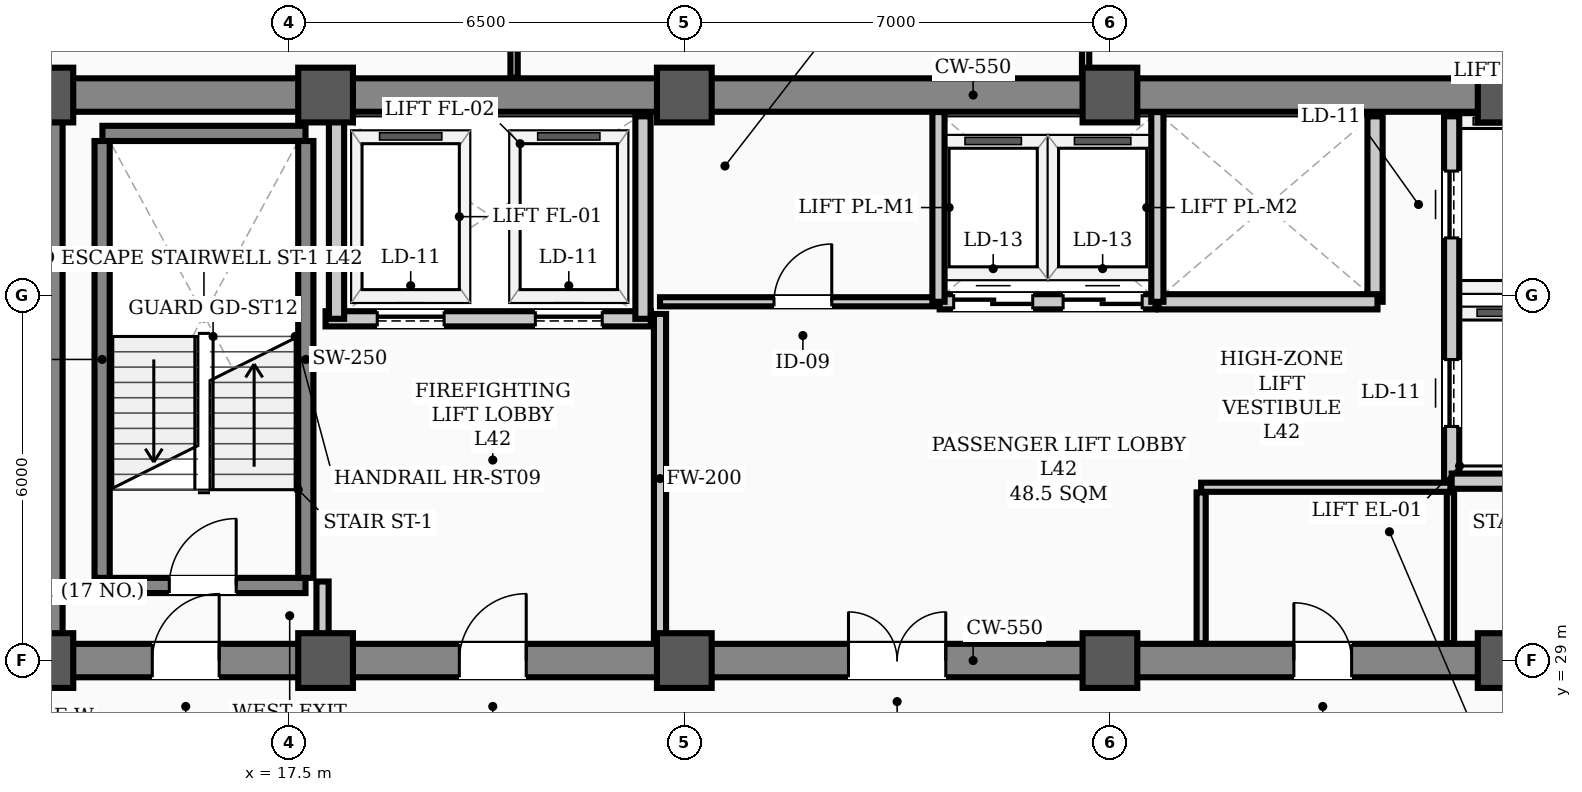
"""IFC4 building model, lengths in metres.
Left out: names, types, materials, properties, quantities, classifications, styles, units other than length and angle.
Written with IfcOpenShell. Run it as: python <this file> out.ifc"""

import sys

from ifc_helpers import new_model, si_unit, direction, frame, frame_2d, origin, origin_2d, place, context, subcontext, project, spatial, rectangle, hollow_rectangle, extrude, element, fill, save


model = new_model("IFC4")
c1 = context("Model", 3, precision=1e-05, world=origin(), true_north=direction((0.0, 1.0)))
c2 = subcontext(c1, "Body", "Model", "MODEL_VIEW")
j1 = project(units=[si_unit("LENGTHUNIT", "METRE"), si_unit("PLANEANGLEUNIT", "RADIAN")], contexts=[c1])
p1 = place(None, origin())
s1 = spatial("IfcSite", under=j1, at=p1, CompositionType="ELEMENT")
p2 = place(p1, origin())
s2 = spatial("IfcBuilding", under=s1, at=p2, CompositionType="ELEMENT")
p3 = place(p2, frame((0.0, 0.0, 169.5)))
s3 = spatial("IfcBuildingStorey", under=s2, at=p3, CompositionType="ELEMENT", Elevation=169.5)
for number, where, z_axis, x_axis in (
    (1, (13.5, 29.0, 0.0), (0.0, 0.0, 1.0), (1.0, 0.0, 0.0)),
    (2, (13.5, 38.3, 0.0), (0.0, 0.0, 1.0), (1.0, 0.0, 0.0)),
    (3, (18.1, 29.0, 0.0), (0.0, 0.0, 1.0), (1.0, 0.0, 0.0)),
    (4, (18.1, 38.3, 0.0), (0.0, 0.0, 1.0), (1.0, 0.0, 0.0)),
    (5, (24.0, 29.0, 0.0), (0.0, 0.0, 1.0), (1.0, 0.0, 0.0)),
    (6, (24.0, 38.3, 0.0), (0.0, 0.0, 1.0), (1.0, 0.0, 0.0)),
    (7, (31.0, 29.0, 0.0), (0.0, 0.0, 1.0), (1.0, 0.0, 0.0)),
    (8, (31.0, 38.3, 0.0), (0.0, 0.0, 1.0), (1.0, 0.0, 0.0)),
    (9, (37.5, 29.0, 0.0), (0.0, 0.0, 1.0), (1.0, 0.0, 0.0)),
    (10, (37.5, 38.3, 0.0), (0.0, 0.0, 1.0), (1.0, 0.0, 0.0)),
):
    element("IfcColumn", number, at=place(p3, frame(where, z_axis=z_axis, x_axis=x_axis)), inside=s3, PredefinedType="COLUMN", context=c2, shape_type="SweptSolid", body=[
        extrude(hollow_rectangle(XDim=0.9, YDim=0.9, WallThickness=0.035, InnerFilletRadius=0.017, OuterFilletRadius=0.052, at=origin_2d()), origin(), (0.0, 0.0, 1.0), 3.9),
    ])
p4 = place(p3, frame((13.5, 29.0, 0.0), z_axis=(0.0, 0.0, 1.0), x_axis=(1.0, 0.0, 0.0)))
e11 = element("IfcWall", 11, at=p4, inside=s3, PredefinedType="SHEAR", context=c2, shape_type="SweptSolid", body=[
    extrude(rectangle(XDim=30.5, YDim=0.55, at=frame_2d((15.25, 0.0))), origin(), (0.0, 0.0, 1.0), 3.72),
])
p5 = place(p4, frame((1.75, 0.0, 0.0)))
e12 = element("IfcOpeningElement", 12, at=p5, cuts=e11, PredefinedType="OPENING", context=c2, shape_type="SweptSolid", body=[
    extrude(rectangle(XDim=1.1, YDim=2.08, at=frame_2d((0.55, 1.04))), frame((0.0, 0.285, 0.0), z_axis=(0.0, -1.0, 0.0), x_axis=(1.0, 0.0, 0.0)), (0.0, 0.0, 1.0), 0.57),
])
p6 = place(p4, frame((26.7, 0.0, 0.0)))
e13 = element("IfcOpeningElement", 13, at=p6, cuts=e11, PredefinedType="OPENING", context=c2, shape_type="SweptSolid", body=[
    extrude(rectangle(XDim=1.1, YDim=2.08, at=frame_2d((0.55, 1.04))), frame((0.0, 0.285, 0.0), z_axis=(0.0, -1.0, 0.0), x_axis=(1.0, 0.0, 0.0)), (0.0, 0.0, 1.0), 0.57),
])
p7 = place(p4, frame((6.8, 0.0, 0.0)))
e14 = element("IfcOpeningElement", 14, at=p7, cuts=e11, PredefinedType="OPENING", context=c2, shape_type="SweptSolid", body=[
    extrude(rectangle(XDim=1.1, YDim=2.08, at=frame_2d((0.55, 1.04))), frame((0.0, 0.285, 0.0), z_axis=(0.0, -1.0, 0.0), x_axis=(1.0, 0.0, 0.0)), (0.0, 0.0, 1.0), 0.57),
])
p8 = place(p4, frame((13.2, 0.0, 0.0)))
e15 = element("IfcOpeningElement", 15, at=p8, cuts=e11, PredefinedType="OPENING", context=c2, shape_type="SweptSolid", body=[
    extrude(rectangle(XDim=1.6, YDim=2.08, at=frame_2d((0.8, 1.04))), frame((0.0, 0.285, 0.0), z_axis=(0.0, -1.0, 0.0), x_axis=(1.0, 0.0, 0.0)), (0.0, 0.0, 1.0), 0.57),
])
p9 = place(p4, frame((20.525, 0.0, 0.0)))
e16 = element("IfcOpeningElement", 16, at=p9, cuts=e11, PredefinedType="OPENING", context=c2, shape_type="SweptSolid", body=[
    extrude(rectangle(XDim=0.95, YDim=2.08, at=frame_2d((0.475, 1.04))), frame((0.0, 0.285, 0.0), z_axis=(0.0, -1.0, 0.0), x_axis=(1.0, 0.0, 0.0)), (0.0, 0.0, 1.0), 0.57),
])
p10 = place(p3, frame((13.5, 38.3, 0.0), z_axis=(0.0, 0.0, 1.0), x_axis=(1.0, 0.0, 0.0)))
e17 = element("IfcWall", 17, at=p10, inside=s3, PredefinedType="SHEAR", context=c2, shape_type="SweptSolid", body=[
    extrude(rectangle(XDim=30.5, YDim=0.55, at=frame_2d((15.25, 0.0))), origin(), (0.0, 0.0, 1.0), 3.72),
])
p11 = place(p3, frame((13.5, 29.35, 0.0), z_axis=(0.0, 0.0, 1.0), x_axis=(0.0, 1.0, 0.0)))
e18 = element("IfcWall", 18, at=p11, inside=s3, PredefinedType="SHEAR", context=c2, shape_type="SweptSolid", body=[
    extrude(rectangle(XDim=8.6, YDim=0.55, at=frame_2d((4.3, 0.0))), origin(), (0.0, 0.0, 1.0), 3.72),
])
p12 = place(p3, frame((14.43, 30.235, 0.0), z_axis=(0.0, 0.0, 1.0), x_axis=(1.0, 0.0, 0.0)))
e19 = element("IfcWall", 19, at=p12, inside=s3, PredefinedType="STANDARD", context=c2, shape_type="SweptSolid", body=[
    extrude(rectangle(XDim=3.34, YDim=0.25, at=frame_2d((1.67, 0.0))), origin(), (0.0, 0.0, 1.0), 3.72),
])
p13 = place(p12, frame((1.1, 0.0, 0.0)))
e20 = element("IfcOpeningElement", 20, at=p13, cuts=e19, PredefinedType="OPENING", context=c2, shape_type="SweptSolid", body=[
    extrude(rectangle(XDim=1.1, YDim=2.08, at=frame_2d((0.55, 1.04))), frame((0.0, 0.135, 0.0), z_axis=(0.0, -1.0, 0.0), x_axis=(1.0, 0.0, 0.0)), (0.0, 0.0, 1.0), 0.27),
])
p14 = place(p3, frame((14.43, 37.669, 0.0), z_axis=(0.0, 0.0, 1.0), x_axis=(1.0, 0.0, 0.0)))
e21 = element("IfcWall", 21, at=p14, inside=s3, PredefinedType="STANDARD", context=c2, shape_type="SweptSolid", body=[
    extrude(rectangle(XDim=3.34, YDim=0.25, at=frame_2d((1.67, 0.0))), origin(), (0.0, 0.0, 1.0), 3.72),
])
for number, where, z_axis, x_axis in (
    (22, (14.425, 30.36, 0.0), (0.0, 0.0, 1.0), (0.0, 1.0, 0.0)),
    (23, (17.775, 30.36, 0.0), (0.0, 0.0, 1.0), (0.0, 1.0, 0.0)),
):
    element("IfcWall", number, at=place(p3, frame(where, z_axis=z_axis, x_axis=x_axis)), inside=s3, PredefinedType="STANDARD", context=c2, shape_type="SweptSolid", body=[
        extrude(rectangle(XDim=7.184, YDim=0.25, at=frame_2d((3.592, 0.0))), origin(), (0.0, 0.0, 1.0), 3.72),
    ])
p15 = place(p3, frame((18.1, 34.62, 0.0), z_axis=(0.0, 0.0, 1.0), x_axis=(1.0, 0.0, 0.0)))
e24 = element("IfcWall", 24, at=p15, inside=s3, PredefinedType="STANDARD", context=c2, shape_type="SweptSolid", body=[
    extrude(rectangle(XDim=5.35, YDim=0.25, at=frame_2d((2.675, 0.0))), origin(), (0.0, 0.0, 1.0), 3.72),
])
p16 = place(p15, frame((0.85, 0.0, 0.0)))
e25 = element("IfcOpeningElement", 25, at=p16, cuts=e24, PredefinedType="OPENING", context=c2, shape_type="SweptSolid", body=[
    extrude(rectangle(XDim=1.1, YDim=2.08, at=frame_2d((0.55, 1.04))), frame((0.0, 0.135, 0.0), z_axis=(0.0, -1.0, 0.0), x_axis=(1.0, 0.0, 0.0)), (0.0, 0.0, 1.0), 0.27),
])
p17 = place(p15, frame((3.45, 0.0, 0.0)))
e26 = element("IfcOpeningElement", 26, at=p17, cuts=e24, PredefinedType="OPENING", context=c2, shape_type="SweptSolid", body=[
    extrude(rectangle(XDim=1.1, YDim=2.08, at=frame_2d((0.55, 1.04))), frame((0.0, 0.135, 0.0), z_axis=(0.0, -1.0, 0.0), x_axis=(1.0, 0.0, 0.0)), (0.0, 0.0, 1.0), 0.27),
])
p18 = place(p3, frame((36.62, 31.95, 0.0), z_axis=(0.0, 0.0, 1.0), x_axis=(0.0, 1.0, 0.0)))
e27 = element("IfcWall", 27, at=p18, inside=s3, PredefinedType="STANDARD", context=c2, shape_type="SweptSolid", body=[
    extrude(rectangle(XDim=6.0, YDim=0.25, at=frame_2d((3.0, 0.0))), origin(), (0.0, 0.0, 1.0), 3.35),
])
p19 = place(p18, frame((0.9, 0.0, 0.0)))
e28 = element("IfcOpeningElement", 28, at=p19, cuts=e27, PredefinedType="OPENING", context=c2, shape_type="SweptSolid", body=[
    extrude(rectangle(XDim=1.1, YDim=2.08, at=frame_2d((0.55, 1.04))), frame((0.0, 0.135, 0.0), z_axis=(0.0, -1.0, 0.0), x_axis=(1.0, 0.0, 0.0)), (0.0, 0.0, 1.0), 0.27),
])
p20 = place(p18, frame((4.0, 0.0, 0.0)))
e29 = element("IfcOpeningElement", 29, at=p20, cuts=e27, PredefinedType="OPENING", context=c2, shape_type="SweptSolid", body=[
    extrude(rectangle(XDim=1.1, YDim=2.08, at=frame_2d((0.55, 1.04))), frame((0.0, 0.135, 0.0), z_axis=(0.0, -1.0, 0.0), x_axis=(1.0, 0.0, 0.0)), (0.0, 0.0, 1.0), 0.27),
])
p21 = place(p3, frame((36.62, 31.95, 0.0), z_axis=(0.0, 0.0, 1.0), x_axis=(1.0, 0.0, 0.0)))
e30 = element("IfcWall", 30, at=p21, inside=s3, PredefinedType="STANDARD", context=c2, shape_type="SweptSolid", body=[
    extrude(rectangle(XDim=1.9, YDim=0.25, at=frame_2d((0.95, 0.0))), origin(), (0.0, 0.0, 1.0), 3.48),
])
for number, where, z_axis, x_axis in (
    (31, (18.28, 34.62, 0.0), (0.0, 0.0, 1.0), (0.0, 1.0, 0.0)),
    (32, (23.32, 34.62, 0.0), (0.0, 0.0, 1.0), (0.0, 1.0, 0.0)),
):
    element("IfcWall", number, at=place(p3, frame(where, z_axis=z_axis, x_axis=x_axis)), inside=s3, PredefinedType="STANDARD", context=c2, shape_type="SweptSolid", body=[
        extrude(rectangle(XDim=3.33, YDim=0.25, at=frame_2d((1.665, 0.0))), origin(), (0.0, 0.0, 1.0), 3.35),
    ])
p22 = place(p3, frame((35.36, 34.9, 0.0), z_axis=(0.0, 0.0, 1.0), x_axis=(0.0, 1.0, 0.0)))
e33 = element("IfcWall", 33, at=p22, inside=s3, PredefinedType="STANDARD", context=c2, shape_type="SweptSolid", body=[
    extrude(rectangle(XDim=3.05, YDim=0.25, at=frame_2d((1.525, 0.0))), origin(), (0.0, 0.0, 1.0), 3.35),
])
p23 = place(p3, frame((28.2, 34.9, 0.0), z_axis=(0.0, 0.0, 1.0), x_axis=(1.0, 0.0, 0.0)))
e34 = element("IfcWall", 34, at=p23, inside=s3, PredefinedType="STANDARD", context=c2, shape_type="SweptSolid", body=[
    extrude(rectangle(XDim=3.55, YDim=0.25, at=frame_2d((1.775, 0.0))), origin(), (0.0, 0.0, 1.0), 3.72),
])
p24 = place(p23, frame((0.23, 0.0, 0.0)))
e35 = element("IfcOpeningElement", 35, at=p24, cuts=e34, PredefinedType="OPENING", context=c2, shape_type="SweptSolid", body=[
    extrude(rectangle(XDim=1.3, YDim=2.08, at=frame_2d((0.65, 1.04))), frame((0.0, 0.135, 0.0), z_axis=(0.0, -1.0, 0.0), x_axis=(1.0, 0.0, 0.0)), (0.0, 0.0, 1.0), 0.27),
])
p25 = place(p23, frame((2.03, 0.0, 0.0)))
e36 = element("IfcOpeningElement", 36, at=p25, cuts=e34, PredefinedType="OPENING", context=c2, shape_type="SweptSolid", body=[
    extrude(rectangle(XDim=1.3, YDim=2.08, at=frame_2d((0.65, 1.04))), frame((0.0, 0.135, 0.0), z_axis=(0.0, -1.0, 0.0), x_axis=(1.0, 0.0, 0.0)), (0.0, 0.0, 1.0), 0.27),
])
p26 = place(p3, frame((31.8, 34.9, 0.0), z_axis=(0.0, 0.0, 1.0), x_axis=(1.0, 0.0, 0.0)))
e37 = element("IfcWall", 37, at=p26, inside=s3, PredefinedType="STANDARD", context=c2, shape_type="SweptSolid", body=[
    extrude(rectangle(XDim=3.6, YDim=0.25, at=frame_2d((1.8, 0.0))), origin(), (0.0, 0.0, 1.0), 3.72),
])
p27 = place(p3, frame((23.6, 34.9, 0.0), z_axis=(0.0, 0.0, 1.0), x_axis=(1.0, 0.0, 0.0)))
e38 = element("IfcWall", 38, at=p27, inside=s3, PredefinedType="PARTITIONING", context=c2, shape_type="SweptSolid", body=[
    extrude(rectangle(XDim=4.58, YDim=0.15, at=frame_2d((2.29, 0.0))), origin(), (0.0, 0.0, 1.0), 3.72),
])
p28 = place(p27, frame((1.875, 0.0, 0.0)))
e39 = element("IfcOpeningElement", 39, at=p28, cuts=e38, PredefinedType="OPENING", context=c2, shape_type="SweptSolid", body=[
    extrude(rectangle(XDim=0.95, YDim=2.08, at=frame_2d((0.475, 1.04))), frame((0.0, 0.085, 0.0), z_axis=(0.0, -1.0, 0.0), x_axis=(1.0, 0.0, 0.0)), (0.0, 0.0, 1.0), 0.17),
])
p29 = place(p3, frame((32.5, 31.85, 0.0), z_axis=(0.0, 0.0, 1.0), x_axis=(1.0, 0.0, 0.0)))
e40 = element("IfcWall", 40, at=p29, inside=s3, PredefinedType="PARTITIONING", context=c2, shape_type="SweptSolid", body=[
    extrude(rectangle(XDim=4.1, YDim=0.15, at=frame_2d((2.05, 0.0))), origin(), (0.0, 0.0, 1.0), 3.72),
])
p30 = place(p3, frame((18.05, 29.285, 0.0), z_axis=(0.0, 0.0, 1.0), x_axis=(0.0, 1.0, 0.0)))
e41 = element("IfcWall", 41, at=p30, inside=s3, PredefinedType="STANDARD", context=c2, shape_type="SweptSolid", body=[
    extrude(rectangle(XDim=1.015, YDim=0.2, at=frame_2d((0.508, 0.0))), origin(), (0.0, 0.0, 1.0), 3.35),
])
p31 = place(p3, frame((23.6, 29.285, 0.0), z_axis=(0.0, 0.0, 1.0), x_axis=(0.0, 1.0, 0.0)))
e42 = element("IfcWall", 42, at=p31, inside=s3, PredefinedType="STANDARD", context=c2, shape_type="SweptSolid", body=[
    extrude(rectangle(XDim=5.415, YDim=0.2, at=frame_2d((2.708, 0.0))), origin(), (0.0, 0.0, 1.0), 3.2),
])
p32 = place(p3, frame((32.5, 29.285, 0.0), z_axis=(0.0, 0.0, 1.0), x_axis=(0.0, 1.0, 0.0)))
e43 = element("IfcWall", 43, at=p32, inside=s3, PredefinedType="PARTITIONING", context=c2, shape_type="SweptSolid", body=[
    extrude(rectangle(XDim=2.48, YDim=0.15, at=frame_2d((1.24, 0.0))), origin(), (0.0, 0.0, 1.0), 3.35),
])
p33 = place(p3, frame((36.6, 29.285, 0.0), z_axis=(0.0, 0.0, 1.0), x_axis=(0.0, 1.0, 0.0)))
e44 = element("IfcWall", 44, at=p33, inside=s3, PredefinedType="PARTITIONING", context=c2, shape_type="SweptSolid", body=[
    extrude(rectangle(XDim=2.48, YDim=0.12, at=frame_2d((1.24, 0.0))), origin(), (0.0, 0.0, 1.0), 3.35),
])
p34 = place(p3, frame((21.2, 38.585, 0.0), z_axis=(0.0, 0.0, 1.0), x_axis=(0.0, 1.0, 0.0)))
e45 = element("IfcWall", 45, at=p34, inside=s3, PredefinedType="PARTITIONING", context=c2, shape_type="SweptSolid", body=[
    extrude(rectangle(XDim=6.355, YDim=0.12, at=frame_2d((3.177, 0.0))), origin(), (0.0, 0.0, 1.0), 3.212),
])
p35 = place(p34, frame((3.435, 0.0, 0.0)))
e46 = element("IfcOpeningElement", 46, at=p35, cuts=e45, PredefinedType="OPENING", context=c2, shape_type="SweptSolid", body=[
    extrude(rectangle(XDim=0.95, YDim=2.08, at=frame_2d((0.475, 1.04))), frame((0.0, 0.07, 0.0), z_axis=(0.0, -1.0, 0.0), x_axis=(1.0, 0.0, 0.0)), (0.0, 0.0, 1.0), 0.14),
])
p36 = place(p3, frame((30.6, 38.585, 0.0), z_axis=(0.0, 0.0, 1.0), x_axis=(0.0, 1.0, 0.0)))
e47 = element("IfcWall", 47, at=p36, inside=s3, PredefinedType="PARTITIONING", context=c2, shape_type="SweptSolid", body=[
    extrude(rectangle(XDim=6.355, YDim=0.12, at=frame_2d((3.177, 0.0))), origin(), (0.0, 0.0, 1.0), 3.2),
])
p37 = place(p36, frame((3.435, 0.0, 0.0)))
e48 = element("IfcOpeningElement", 48, at=p37, cuts=e47, PredefinedType="OPENING", context=c2, shape_type="SweptSolid", body=[
    extrude(rectangle(XDim=0.95, YDim=2.08, at=frame_2d((0.475, 1.04))), frame((0.0, 0.07, 0.0), z_axis=(0.0, -1.0, 0.0), x_axis=(1.0, 0.0, 0.0)), (0.0, 0.0, 1.0), 0.14),
])
for number, where, z_axis, x_axis in (
    (49, (28.18, 34.9, 0.0), (0.0, 0.0, 1.0), (0.0, 1.0, 0.0)),
    (50, (31.78, 34.9, 0.0), (0.0, 0.0, 1.0), (0.0, 1.0, 0.0)),
):
    element("IfcWall", number, at=place(p3, frame(where, z_axis=z_axis, x_axis=x_axis)), inside=s3, PredefinedType="STANDARD", context=c2, shape_type="SweptSolid", body=[
        extrude(rectangle(XDim=3.12, YDim=0.2, at=frame_2d((1.56, 0.0))), origin(), (0.0, 0.0, 1.0), 3.35),
    ])
p38 = place(p13, origin())
e51 = element("IfcDoor", 51, at=p38, inside=s3, OperationType="SINGLE_SWING_RIGHT", PredefinedType="DOOR", context=c2, shape_type="SweptSolid", body=[
    extrude(rectangle(XDim=1.1, YDim=2.08, at=frame_2d((0.55, 1.04))), frame((0.0, 0.025, 0.0), z_axis=(0.0, -1.0, 0.0), x_axis=(1.0, 0.0, 0.0)), (0.0, 0.0, 1.0), 0.05),
])
fill(e20, e51)
p39 = place(p5, origin())
e52 = element("IfcDoor", 52, at=p39, inside=s3, OperationType="SINGLE_SWING_RIGHT", PredefinedType="DOOR", context=c2, shape_type="SweptSolid", body=[
    extrude(rectangle(XDim=1.1, YDim=2.08, at=frame_2d((0.55, 1.04))), frame((0.0, 0.025, 0.0), z_axis=(0.0, -1.0, 0.0), x_axis=(1.0, 0.0, 0.0)), (0.0, 0.0, 1.0), 0.05),
])
fill(e12, e52)
p40 = place(p7, origin())
e53 = element("IfcDoor", 53, at=p40, inside=s3, OperationType="SINGLE_SWING_RIGHT", PredefinedType="DOOR", context=c2, shape_type="SweptSolid", body=[
    extrude(rectangle(XDim=1.1, YDim=2.08, at=frame_2d((0.55, 1.04))), frame((0.0, 0.025, 0.0), z_axis=(0.0, -1.0, 0.0), x_axis=(1.0, 0.0, 0.0)), (0.0, 0.0, 1.0), 0.05),
])
fill(e14, e53)
p41 = place(p8, origin())
e54 = element("IfcDoor", 54, at=p41, inside=s3, OperationType="DOUBLE_DOOR_SINGLE_SWING", PredefinedType="DOOR", context=c2, shape_type="SweptSolid", body=[
    extrude(rectangle(XDim=1.6, YDim=2.08, at=frame_2d((0.8, 1.04))), frame((0.0, 0.025, 0.0), z_axis=(0.0, -1.0, 0.0), x_axis=(1.0, 0.0, 0.0)), (0.0, 0.0, 1.0), 0.05),
])
fill(e15, e54)
p42 = place(p28, origin())
e55 = element("IfcDoor", 55, at=p42, inside=s3, OperationType="SINGLE_SWING_RIGHT", PredefinedType="DOOR", context=c2, shape_type="SweptSolid", body=[
    extrude(rectangle(XDim=0.95, YDim=2.08, at=frame_2d((0.475, 1.04))), frame((0.0, 0.025, 0.0), z_axis=(0.0, -1.0, 0.0), x_axis=(1.0, 0.0, 0.0)), (0.0, 0.0, 1.0), 0.05),
])
fill(e39, e55)
p43 = place(p9, origin())
e56 = element("IfcDoor", 56, at=p43, inside=s3, OperationType="SINGLE_SWING_LEFT", PredefinedType="DOOR", context=c2, shape_type="SweptSolid", body=[
    extrude(rectangle(XDim=0.95, YDim=2.08, at=frame_2d((0.475, 1.04))), frame((0.0, 0.025, 0.0), z_axis=(0.0, -1.0, 0.0), x_axis=(1.0, 0.0, 0.0)), (0.0, 0.0, 1.0), 0.05),
])
fill(e16, e56)
p44 = place(p16, origin())
e57 = element("IfcDoor", 57, at=p44, inside=s3, OperationType="SLIDING_TO_LEFT", PredefinedType="DOOR", context=c2, shape_type="SweptSolid", body=[
    extrude(rectangle(XDim=1.1, YDim=2.08, at=frame_2d((0.55, 1.04))), frame((0.0, 0.025, 0.0), z_axis=(0.0, -1.0, 0.0), x_axis=(1.0, 0.0, 0.0)), (0.0, 0.0, 1.0), 0.05),
])
fill(e25, e57)
p45 = place(p17, origin())
e58 = element("IfcDoor", 58, at=p45, inside=s3, OperationType="SLIDING_TO_LEFT", PredefinedType="DOOR", context=c2, shape_type="SweptSolid", body=[
    extrude(rectangle(XDim=1.1, YDim=2.08, at=frame_2d((0.55, 1.04))), frame((0.0, 0.025, 0.0), z_axis=(0.0, -1.0, 0.0), x_axis=(1.0, 0.0, 0.0)), (0.0, 0.0, 1.0), 0.05),
])
fill(e26, e58)
p46 = place(p19, origin())
e59 = element("IfcDoor", 59, at=p46, inside=s3, OperationType="SLIDING_TO_LEFT", PredefinedType="DOOR", context=c2, shape_type="SweptSolid", body=[
    extrude(rectangle(XDim=1.1, YDim=2.08, at=frame_2d((0.55, 1.04))), frame((0.0, 0.025, 0.0), z_axis=(0.0, -1.0, 0.0), x_axis=(1.0, 0.0, 0.0)), (0.0, 0.0, 1.0), 0.05),
])
fill(e28, e59)
p47 = place(p20, origin())
e60 = element("IfcDoor", 60, at=p47, inside=s3, OperationType="SLIDING_TO_LEFT", PredefinedType="DOOR", context=c2, shape_type="SweptSolid", body=[
    extrude(rectangle(XDim=1.1, YDim=2.08, at=frame_2d((0.55, 1.04))), frame((0.0, 0.025, 0.0), z_axis=(0.0, -1.0, 0.0), x_axis=(1.0, 0.0, 0.0)), (0.0, 0.0, 1.0), 0.05),
])
fill(e29, e60)
p48 = place(p24, origin())
e61 = element("IfcDoor", 61, at=p48, inside=s3, OperationType="DOUBLE_DOOR_SLIDING", PredefinedType="DOOR", context=c2, shape_type="SweptSolid", body=[
    extrude(rectangle(XDim=1.3, YDim=2.08, at=frame_2d((0.65, 1.04))), frame((0.0, 0.025, 0.0), z_axis=(0.0, -1.0, 0.0), x_axis=(1.0, 0.0, 0.0)), (0.0, 0.0, 1.0), 0.05),
])
fill(e35, e61)
p49 = place(p25, origin())
e62 = element("IfcDoor", 62, at=p49, inside=s3, OperationType="DOUBLE_DOOR_SLIDING", PredefinedType="DOOR", context=c2, shape_type="SweptSolid", body=[
    extrude(rectangle(XDim=1.3, YDim=2.08, at=frame_2d((0.65, 1.04))), frame((0.0, 0.025, 0.0), z_axis=(0.0, -1.0, 0.0), x_axis=(1.0, 0.0, 0.0)), (0.0, 0.0, 1.0), 0.05),
])
fill(e36, e62)
save(model, sys.argv[1])
